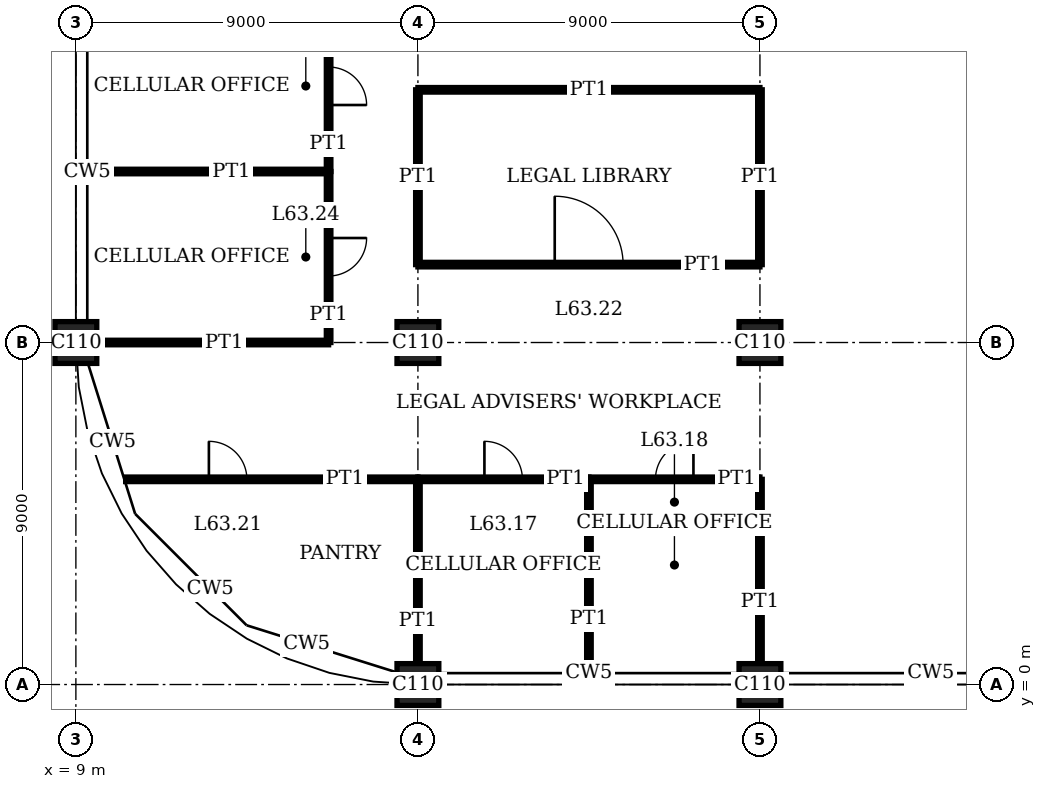
"""IFC4 building model, lengths in metres.
Left out: names, types, materials, properties, quantities, classifications, styles, units other than length and angle.
Written with IfcOpenShell. Run it as: python <this file> out.ifc"""

import sys

from ifc_helpers import new_model, si_unit, direction, frame, frame_2d, origin, origin_2d, place, context, subcontext, project, spatial, rectangle, extrude, element, fill, save


model = new_model("IFC4")
c1 = context("Model", 3, precision=1e-05, world=origin(), true_north=direction((0.0, 1.0)))
c2 = subcontext(c1, "Body", "Model", "MODEL_VIEW")
j1 = project(units=[si_unit("LENGTHUNIT", "METRE"), si_unit("PLANEANGLEUNIT", "RADIAN")], contexts=[c1])
p1 = place(None, origin())
s1 = spatial("IfcSite", under=j1, at=p1, CompositionType="ELEMENT")
p2 = place(p1, origin())
s2 = spatial("IfcBuilding", under=s1, at=p2, CompositionType="ELEMENT")
p3 = place(p2, frame((0.0, 0.0, 259.4)))
s3 = spatial("IfcBuildingStorey", under=s2, at=p3, CompositionType="ELEMENT", Elevation=259.4)
for number, where, z_axis, x_axis in (
    (1, (9.0, 9.0, 0.0), (0.0, 0.0, 1.0), (1.0, 0.0, 0.0)),
    (2, (18.0, 0.0, 0.0), (0.0, 0.0, 1.0), (1.0, 0.0, 0.0)),
    (3, (18.0, 9.0, 0.0), (0.0, 0.0, 1.0), (1.0, 0.0, 0.0)),
    (4, (27.0, 0.0, 0.0), (0.0, 0.0, 1.0), (1.0, 0.0, 0.0)),
    (5, (27.0, 9.0, 0.0), (0.0, 0.0, 1.0), (1.0, 0.0, 0.0)),
):
    element("IfcColumn", number, at=place(p3, frame(where, z_axis=z_axis, x_axis=x_axis)), inside=s3, PredefinedType="COLUMN", context=c2, shape_type="SweptSolid", body=[
        extrude(rectangle(XDim=1.1, YDim=1.1, at=origin_2d()), origin(), (0.0, 0.0, 1.0), 4.0),
    ])
p4 = place(p3, frame((18.0, 5.4, 0.0), z_axis=(0.0, 0.0, 1.0), x_axis=(1.0, 0.0, 0.0)))
e6 = element("IfcWall", 6, at=p4, inside=s3, PredefinedType="PARTITIONING", context=c2, shape_type="SweptSolid", body=[
    extrude(rectangle(XDim=4.5, YDim=0.12, at=frame_2d((2.25, 0.0))), origin(), (0.0, 0.0, 1.0), 3.75),
])
p5 = place(p4, frame((1.75, 0.0, 0.0)))
e7 = element("IfcOpeningElement", 7, at=p5, cuts=e6, PredefinedType="OPENING", context=c2, shape_type="SweptSolid", body=[
    extrude(rectangle(XDim=1.0, YDim=2.4, at=frame_2d((0.5, 1.2))), frame((0.0, 0.07, 0.0), z_axis=(0.0, -1.0, 0.0), x_axis=(1.0, 0.0, 0.0)), (0.0, 0.0, 1.0), 0.14),
])
p6 = place(p3, frame((22.5, 5.4, 0.0), z_axis=(0.0, 0.0, 1.0), x_axis=(1.0, 0.0, 0.0)))
e8 = element("IfcWall", 8, at=p6, inside=s3, PredefinedType="PARTITIONING", context=c2, shape_type="SweptSolid", body=[
    extrude(rectangle(XDim=4.5, YDim=0.12, at=frame_2d((2.25, 0.0))), origin(), (0.0, 0.0, 1.0), 3.75),
])
p7 = place(p6, frame((1.75, 0.0, 0.0)))
e9 = element("IfcOpeningElement", 9, at=p7, cuts=e8, PredefinedType="OPENING", context=c2, shape_type="SweptSolid", body=[
    extrude(rectangle(XDim=1.0, YDim=2.4, at=frame_2d((0.5, 1.2))), frame((0.0, 0.07, 0.0), z_axis=(0.0, -1.0, 0.0), x_axis=(1.0, 0.0, 0.0)), (0.0, 0.0, 1.0), 0.14),
])
p8 = place(p3, frame((10.31, 5.4, 0.0), z_axis=(0.0, 0.0, 1.0), x_axis=(1.0, 0.0, 0.0)))
e10 = element("IfcWall", 10, at=p8, inside=s3, PredefinedType="PARTITIONING", context=c2, shape_type="SweptSolid", body=[
    extrude(rectangle(XDim=7.69, YDim=0.12, at=frame_2d((3.845, 0.0))), origin(), (0.0, 0.0, 1.0), 3.75),
])
p9 = place(p8, frame((2.19, 0.0, 0.0)))
e11 = element("IfcOpeningElement", 11, at=p9, cuts=e10, PredefinedType="OPENING", context=c2, shape_type="SweptSolid", body=[
    extrude(rectangle(XDim=1.0, YDim=2.4, at=frame_2d((0.5, 1.2))), frame((0.0, 0.07, 0.0), z_axis=(0.0, -1.0, 0.0), x_axis=(1.0, 0.0, 0.0)), (0.0, 0.0, 1.0), 0.14),
])
p10 = place(p3, frame((9.55, 9.0, 0.0), z_axis=(0.0, 0.0, 1.0), x_axis=(1.0, 0.0, 0.0)))
e12 = element("IfcWall", 12, at=p10, inside=s3, PredefinedType="PARTITIONING", context=c2, shape_type="SweptSolid", body=[
    extrude(rectangle(XDim=6.1, YDim=0.12, at=frame_2d((3.05, 0.0))), origin(), (0.0, 0.0, 1.0), 3.05),
])
p11 = place(p3, frame((18.0, 11.05, 0.0), z_axis=(0.0, 0.0, 1.0), x_axis=(1.0, 0.0, 0.0)))
e13 = element("IfcWall", 13, at=p11, inside=s3, PredefinedType="PARTITIONING", context=c2, shape_type="SweptSolid", body=[
    extrude(rectangle(XDim=9.0, YDim=0.12, at=frame_2d((4.5, 0.0))), origin(), (0.0, 0.0, 1.0), 3.75),
])
p12 = place(p11, frame((3.6, 0.0, 0.0)))
e14 = element("IfcOpeningElement", 14, at=p12, cuts=e13, PredefinedType="OPENING", context=c2, shape_type="SweptSolid", body=[
    extrude(rectangle(XDim=1.8, YDim=2.4, at=frame_2d((0.9, 1.2))), frame((0.0, 0.07, 0.0), z_axis=(0.0, -1.0, 0.0), x_axis=(1.0, 0.0, 0.0)), (0.0, 0.0, 1.0), 0.14),
])
p13 = place(p3, frame((9.31, 13.5, 0.0), z_axis=(0.0, 0.0, 1.0), x_axis=(1.0, 0.0, 0.0)))
e15 = element("IfcWall", 15, at=p13, inside=s3, PredefinedType="PARTITIONING", context=c2, shape_type="SweptSolid", body=[
    extrude(rectangle(XDim=6.34, YDim=0.12, at=frame_2d((3.17, 0.0))), origin(), (0.0, 0.0, 1.0), 3.1),
])
p14 = place(p3, frame((18.0, 15.65, 0.0), z_axis=(0.0, 0.0, 1.0), x_axis=(1.0, 0.0, 0.0)))
e16 = element("IfcWall", 16, at=p14, inside=s3, PredefinedType="PARTITIONING", context=c2, shape_type="SweptSolid", body=[
    extrude(rectangle(XDim=9.0, YDim=0.12, at=frame_2d((4.5, 0.0))), origin(), (0.0, 0.0, 1.0), 3.75),
])
p15 = place(p3, frame((15.65, 9.0, 0.0), z_axis=(0.0, 0.0, 1.0), x_axis=(0.0, 1.0, 0.0)))
e17 = element("IfcWall", 17, at=p15, inside=s3, PredefinedType="PARTITIONING", context=c2, shape_type="SweptSolid", body=[
    extrude(rectangle(XDim=4.5, YDim=0.12, at=frame_2d((2.25, 0.0))), origin(), (0.0, 0.0, 1.0), 3.75),
])
p16 = place(p15, frame((1.75, 0.0, 0.0)))
e18 = element("IfcOpeningElement", 18, at=p16, cuts=e17, PredefinedType="OPENING", context=c2, shape_type="SweptSolid", body=[
    extrude(rectangle(XDim=1.0, YDim=2.4, at=frame_2d((0.5, 1.2))), frame((0.0, 0.07, 0.0), z_axis=(0.0, -1.0, 0.0), x_axis=(1.0, 0.0, 0.0)), (0.0, 0.0, 1.0), 0.14),
])
p17 = place(p3, frame((15.65, 13.5, 0.0), z_axis=(0.0, 0.0, 1.0), x_axis=(0.0, 1.0, 0.0)))
e19 = element("IfcWall", 19, at=p17, inside=s3, PredefinedType="PARTITIONING", context=c2, shape_type="SweptSolid", body=[
    extrude(rectangle(XDim=4.5, YDim=0.12, at=frame_2d((2.25, 0.0))), origin(), (0.0, 0.0, 1.0), 3.75),
])
p18 = place(p17, frame((1.75, 0.0, 0.0)))
e20 = element("IfcOpeningElement", 20, at=p18, cuts=e19, PredefinedType="OPENING", context=c2, shape_type="SweptSolid", body=[
    extrude(rectangle(XDim=1.0, YDim=2.4, at=frame_2d((0.5, 1.2))), frame((0.0, 0.07, 0.0), z_axis=(0.0, -1.0, 0.0), x_axis=(1.0, 0.0, 0.0)), (0.0, 0.0, 1.0), 0.14),
])
p19 = place(p3, frame((18.0, 0.55, 0.0), z_axis=(0.0, 0.0, 1.0), x_axis=(0.0, 1.0, 0.0)))
e21 = element("IfcWall", 21, at=p19, inside=s3, PredefinedType="PARTITIONING", context=c2, shape_type="SweptSolid", body=[
    extrude(rectangle(XDim=4.85, YDim=0.12, at=frame_2d((2.425, 0.0))), origin(), (0.0, 0.0, 1.0), 3.05),
])
p20 = place(p3, frame((18.0, 11.05, 0.0), z_axis=(0.0, 0.0, 1.0), x_axis=(0.0, 1.0, 0.0)))
e22 = element("IfcWall", 22, at=p20, inside=s3, PredefinedType="PARTITIONING", context=c2, shape_type="SweptSolid", body=[
    extrude(rectangle(XDim=4.6, YDim=0.12, at=frame_2d((2.3, 0.0))), origin(), (0.0, 0.0, 1.0), 3.05),
])
p21 = place(p3, frame((22.5, 0.31, 0.0), z_axis=(0.0, 0.0, 1.0), x_axis=(0.0, 1.0, 0.0)))
e23 = element("IfcWall", 23, at=p21, inside=s3, PredefinedType="PARTITIONING", context=c2, shape_type="SweptSolid", body=[
    extrude(rectangle(XDim=5.09, YDim=0.12, at=frame_2d((2.545, 0.0))), origin(), (0.0, 0.0, 1.0), 3.75),
])
p22 = place(p3, frame((27.0, 0.55, 0.0), z_axis=(0.0, 0.0, 1.0), x_axis=(0.0, 1.0, 0.0)))
e24 = element("IfcWall", 24, at=p22, inside=s3, PredefinedType="PARTITIONING", context=c2, shape_type="SweptSolid", body=[
    extrude(rectangle(XDim=4.85, YDim=0.12, at=frame_2d((2.425, 0.0))), origin(), (0.0, 0.0, 1.0), 3.05),
])
p23 = place(p3, frame((27.0, 11.05, 0.0), z_axis=(0.0, 0.0, 1.0), x_axis=(0.0, 1.0, 0.0)))
e25 = element("IfcWall", 25, at=p23, inside=s3, PredefinedType="PARTITIONING", context=c2, shape_type="SweptSolid", body=[
    extrude(rectangle(XDim=4.6, YDim=0.12, at=frame_2d((2.3, 0.0))), origin(), (0.0, 0.0, 1.0), 3.05),
])
p24 = place(p5, origin())
e26 = element("IfcDoor", 26, at=p24, inside=s3, OperationType="SINGLE_SWING_RIGHT", PredefinedType="DOOR", context=c2, shape_type="SweptSolid", body=[
    extrude(rectangle(XDim=1.0, YDim=2.4, at=frame_2d((0.5, 1.2))), frame((0.0, 0.025, 0.0), z_axis=(0.0, -1.0, 0.0), x_axis=(1.0, 0.0, 0.0)), (0.0, 0.0, 1.0), 0.05),
])
fill(e7, e26)
p25 = place(p7, origin())
e27 = element("IfcDoor", 27, at=p25, inside=s3, OperationType="SINGLE_SWING_LEFT", PredefinedType="DOOR", context=c2, shape_type="SweptSolid", body=[
    extrude(rectangle(XDim=1.0, YDim=2.4, at=frame_2d((0.5, 1.2))), frame((0.0, 0.025, 0.0), z_axis=(0.0, -1.0, 0.0), x_axis=(1.0, 0.0, 0.0)), (0.0, 0.0, 1.0), 0.05),
])
fill(e9, e27)
p26 = place(p9, origin())
e28 = element("IfcDoor", 28, at=p26, inside=s3, OperationType="SINGLE_SWING_RIGHT", PredefinedType="DOOR", context=c2, shape_type="SweptSolid", body=[
    extrude(rectangle(XDim=1.0, YDim=2.4, at=frame_2d((0.5, 1.2))), frame((0.0, 0.025, 0.0), z_axis=(0.0, -1.0, 0.0), x_axis=(1.0, 0.0, 0.0)), (0.0, 0.0, 1.0), 0.05),
])
fill(e11, e28)
p27 = place(p12, origin())
e29 = element("IfcDoor", 29, at=p27, inside=s3, OperationType="DOUBLE_DOOR_SINGLE_SWING", PredefinedType="DOOR", context=c2, shape_type="SweptSolid", body=[
    extrude(rectangle(XDim=1.8, YDim=2.4, at=frame_2d((0.9, 1.2))), frame((0.0, 0.025, 0.0), z_axis=(0.0, -1.0, 0.0), x_axis=(1.0, 0.0, 0.0)), (0.0, 0.0, 1.0), 0.05),
])
fill(e14, e29)
p28 = place(p16, origin())
e30 = element("IfcDoor", 30, at=p28, inside=s3, OperationType="SINGLE_SWING_RIGHT", PredefinedType="DOOR", context=c2, shape_type="SweptSolid", body=[
    extrude(rectangle(XDim=1.0, YDim=2.4, at=frame_2d((0.5, 1.2))), frame((0.0, 0.025, 0.0), z_axis=(0.0, -1.0, 0.0), x_axis=(1.0, 0.0, 0.0)), (0.0, 0.0, 1.0), 0.05),
])
fill(e18, e30)
p29 = place(p18, origin())
e31 = element("IfcDoor", 31, at=p29, inside=s3, OperationType="SINGLE_SWING_LEFT", PredefinedType="DOOR", context=c2, shape_type="SweptSolid", body=[
    extrude(rectangle(XDim=1.0, YDim=2.4, at=frame_2d((0.5, 1.2))), frame((0.0, 0.025, 0.0), z_axis=(0.0, -1.0, 0.0), x_axis=(1.0, 0.0, 0.0)), (0.0, 0.0, 1.0), 0.05),
])
fill(e20, e31)
save(model, sys.argv[1])
